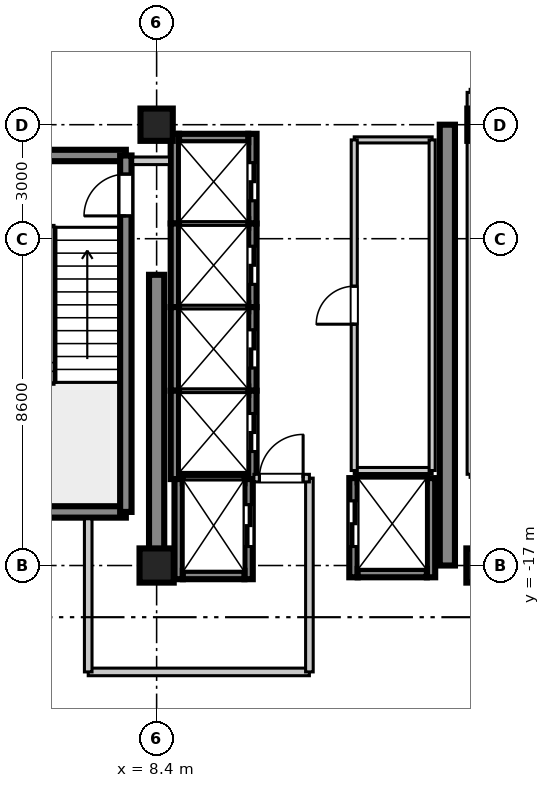
"""IFC4 building model, lengths in metres.
Left out: names, types, materials, properties, quantities, classifications, styles, units other than length and angle.
Written with IfcOpenShell. Run it as: python <this file> out.ifc"""

import sys

from ifc_helpers import new_model, si_unit, direction, frame, frame_2d, origin, origin_2d, place, context, subcontext, project, spatial, rectangle, extrude, source, transform, mapped, element, fill, save


model = new_model("IFC4")
c1 = context("Model", 3, precision=1e-05, world=origin(), true_north=direction((0.0, 1.0)))
c2 = subcontext(c1, "Body", "Model", "MODEL_VIEW")
j1 = project(units=[si_unit("LENGTHUNIT", "METRE"), si_unit("PLANEANGLEUNIT", "RADIAN")], contexts=[c1])
p1 = place(None, origin())
s1 = spatial("IfcSite", under=j1, at=p1, CompositionType="ELEMENT")
p2 = place(p1, origin())
s2 = spatial("IfcBuilding", under=s1, at=p2, CompositionType="ELEMENT")
p3 = place(p2, frame((0.0, 0.0, 343.05)))
s3 = spatial("IfcBuildingStorey", under=s2, at=p3, CompositionType="ELEMENT", Elevation=343.05)
m1 = source(origin(), c2, "Body", "SweptSolid", [
    extrude(rectangle(XDim=0.9, YDim=0.9, at=origin_2d()), origin(), (0.0, 0.0, 1.0), 4.455),
])
p4 = place(p3, frame((8.4, -17.0, 0.0), z_axis=(0.0, 0.0, 1.0), x_axis=(1.0, 0.0, 0.0)))
e1 = element("IfcColumn", 1, at=p4, inside=s3, PredefinedType="COLUMN", context=c2, shape_type="MappedRepresentation", body=[
    mapped(m1, transform((0.0, 0.0, 0.0), scale=1.0)),
])
m2 = source(origin(), c2, "Body", "SweptSolid", [
    extrude(rectangle(XDim=0.85, YDim=0.85, at=origin_2d()), origin(), (0.0, 0.0, 1.0), 4.455),
])
p5 = place(p3, frame((8.4, -5.4, 0.0), z_axis=(0.0, 0.0, 1.0), x_axis=(1.0, 0.0, 0.0)))
e2 = element("IfcColumn", 2, at=p5, inside=s3, PredefinedType="PILASTER", context=c2, shape_type="MappedRepresentation", body=[
    mapped(m2, transform((0.0, 0.0, 0.0), scale=1.0)),
])
p6 = place(p3, frame((17.0, -17.0, 0.0), z_axis=(0.0, 0.0, 1.0), x_axis=(1.0, 0.0, 0.0)))
e3 = element("IfcColumn", 3, at=p6, inside=s3, PredefinedType="COLUMN", context=c2, shape_type="MappedRepresentation", body=[
    mapped(m1, transform((0.0, 0.0, 0.0), scale=1.0)),
])
p7 = place(p3, frame((17.0, -5.4, 0.0), z_axis=(0.0, 0.0, 1.0), x_axis=(1.0, 0.0, 0.0)))
e4 = element("IfcColumn", 4, at=p7, inside=s3, PredefinedType="PILASTER", context=c2, shape_type="MappedRepresentation", body=[
    mapped(m2, transform((0.0, 0.0, 0.0), scale=1.0)),
])
m3 = source(origin(), c2, "Body", "SweptSolid", [
    extrude(rectangle(XDim=7.65, YDim=0.4, at=frame_2d((3.825, 0.0))), origin(), (0.0, 0.0, 1.0), 4.17),
])
p8 = place(p3, frame((8.4, -17.0, 0.0), z_axis=(0.0, 0.0, 1.0), x_axis=(0.0, 1.0, 0.0)))
e5 = element("IfcWall", 5, at=p8, inside=s3, PredefinedType="SHEAR", context=c2, shape_type="MappedRepresentation", body=[
    mapped(m3, transform((0.0, 0.0, 0.0), scale=1.0)),
])
m4 = source(origin(), c2, "Body", "SweptSolid", [
    extrude(rectangle(XDim=11.6, YDim=0.4, at=frame_2d((5.8, 0.0))), origin(), (0.0, 0.0, 1.0), 4.17),
])
p9 = place(p3, frame((16.05, -17.0, 0.0), z_axis=(0.0, 0.0, 1.0), x_axis=(0.0, 1.0, 0.0)))
e6 = element("IfcWall", 6, at=p9, inside=s3, PredefinedType="SHEAR", context=c2, shape_type="MappedRepresentation", body=[
    mapped(m4, transform((0.0, 0.0, 0.0), scale=1.0)),
])
m5 = source(origin(), c2, "Body", "SweptSolid", [
    extrude(rectangle(XDim=3.98, YDim=0.3, at=frame_2d((1.99, 0.0))), origin(), (0.0, 0.0, 1.0), 4.17),
])
for number, where, z_axis, x_axis in (
    (7, (3.61, -15.59, 0.0), (0.0, 0.0, 1.0), (1.0, 0.0, 0.0)),
    (8, (3.61, -6.21, 0.0), (0.0, 0.0, 1.0), (1.0, 0.0, 0.0)),
):
    element("IfcWall", number, at=place(p3, frame(where, z_axis=z_axis, x_axis=x_axis)), inside=s3, PredefinedType="SHEAR", context=c2, shape_type="MappedRepresentation", body=[
        mapped(m5, transform((0.0, 0.0, 0.0), scale=1.0)),
    ])
m6 = source(origin(), c2, "Body", "SweptSolid", [
    extrude(rectangle(XDim=9.38, YDim=0.3, at=frame_2d((4.69, 0.0))), origin(), (0.0, 0.0, 1.0), 4.17),
])
p10 = place(p3, frame((7.59, -15.59, 0.0), z_axis=(0.0, 0.0, 1.0), x_axis=(0.0, 1.0, 0.0)))
e9 = element("IfcWall", 9, at=p10, inside=s3, PredefinedType="SHEAR", context=c2, shape_type="MappedRepresentation", body=[
    mapped(m6, transform((0.0, 0.0, 0.0), scale=1.0)),
])
p11 = place(p10, frame((7.79, 0.0, 0.0)))
e10 = element("IfcOpeningElement", 10, at=p11, cuts=e9, PredefinedType="OPENING", context=c2, shape_type="SweptSolid", body=[
    extrude(rectangle(XDim=1.1, YDim=2.15, at=frame_2d((0.55, 1.075))), frame((0.0, 0.16, 0.0), z_axis=(0.0, -1.0, 0.0), x_axis=(1.0, 0.0, 0.0)), (0.0, 0.0, 1.0), 0.32),
])
m7 = source(origin(), c2, "Body", "SweptSolid", [
    extrude(rectangle(XDim=2.36, YDim=0.22, at=frame_2d((1.18, 0.0))), origin(), (0.0, 0.0, 1.0), 4.17),
])
p12 = place(p3, frame((8.88, -8.0, 0.0), z_axis=(0.0, 0.0, 1.0), x_axis=(0.0, 1.0, 0.0)))
e11 = element("IfcWall", 11, at=p12, inside=s3, PredefinedType="SHEAR", context=c2, shape_type="MappedRepresentation", body=[
    mapped(m7, transform((0.0, 0.0, 0.0), scale=1.0)),
])
p13 = place(p3, frame((10.92, -8.0, 0.0), z_axis=(0.0, 0.0, 1.0), x_axis=(0.0, 1.0, 0.0)))
e12 = element("IfcWall", 12, at=p13, inside=s3, PredefinedType="SHEAR", context=c2, shape_type="MappedRepresentation", body=[
    mapped(m7, transform((0.0, 0.0, 0.0), scale=1.0)),
])
p14 = place(p13, frame((0.6, 0.0, 0.0)))
e13 = element("IfcOpeningElement", 13, at=p14, cuts=e12, PredefinedType="OPENING", context=c2, shape_type="SweptSolid", body=[
    extrude(rectangle(XDim=1.0, YDim=2.2, at=frame_2d((0.5, 1.1))), frame((0.0, 0.12, 0.0), z_axis=(0.0, -1.0, 0.0), x_axis=(1.0, 0.0, 0.0)), (0.0, 0.0, 1.0), 0.24),
])
m8 = source(origin(), c2, "Body", "SweptSolid", [
    extrude(rectangle(XDim=1.82, YDim=0.22, at=frame_2d((0.91, 0.0))), origin(), (0.0, 0.0, 1.0), 4.17),
])
p15 = place(p3, frame((8.99, -5.75, 0.0), z_axis=(0.0, 0.0, 1.0), x_axis=(1.0, 0.0, 0.0)))
e14 = element("IfcWall", 14, at=p15, inside=s3, PredefinedType="SHEAR", context=c2, shape_type="MappedRepresentation", body=[
    mapped(m8, transform((0.0, 0.0, 0.0), scale=1.0)),
])
m9 = source(origin(), c2, "Body", "SweptSolid", [
    extrude(rectangle(XDim=2.2, YDim=0.22, at=frame_2d((1.1, 0.0))), origin(), (0.0, 0.0, 1.0), 4.17),
])
p16 = place(p3, frame((8.88, -10.2, 0.0), z_axis=(0.0, 0.0, 1.0), x_axis=(0.0, 1.0, 0.0)))
e15 = element("IfcWall", 15, at=p16, inside=s3, PredefinedType="SHEAR", context=c2, shape_type="MappedRepresentation", body=[
    mapped(m9, transform((0.0, 0.0, 0.0), scale=1.0)),
])
p17 = place(p3, frame((10.92, -10.2, 0.0), z_axis=(0.0, 0.0, 1.0), x_axis=(0.0, 1.0, 0.0)))
e16 = element("IfcWall", 16, at=p17, inside=s3, PredefinedType="SHEAR", context=c2, shape_type="MappedRepresentation", body=[
    mapped(m9, transform((0.0, 0.0, 0.0), scale=1.0)),
])
p18 = place(p17, frame((0.6, 0.0, 0.0)))
e17 = element("IfcOpeningElement", 17, at=p18, cuts=e16, PredefinedType="OPENING", context=c2, shape_type="SweptSolid", body=[
    extrude(rectangle(XDim=1.0, YDim=2.2, at=frame_2d((0.5, 1.1))), frame((0.0, 0.12, 0.0), z_axis=(0.0, -1.0, 0.0), x_axis=(1.0, 0.0, 0.0)), (0.0, 0.0, 1.0), 0.24),
])
m10 = source(origin(), c2, "Body", "SweptSolid", [
    extrude(rectangle(XDim=1.82, YDim=0.22, at=frame_2d((0.91, 0.0))), origin(), (0.0, 0.0, 1.0), 4.5),
])
p19 = place(p3, frame((8.99, -8.0, 0.0), z_axis=(0.0, 0.0, 1.0), x_axis=(1.0, 0.0, 0.0)))
e18 = element("IfcWall", 18, at=p19, inside=s3, PredefinedType="SHEAR", context=c2, shape_type="MappedRepresentation", body=[
    mapped(m10, transform((0.0, 0.0, 0.0), scale=1.0)),
])
p20 = place(p3, frame((8.88, -12.4, 0.0), z_axis=(0.0, 0.0, 1.0), x_axis=(0.0, 1.0, 0.0)))
e19 = element("IfcWall", 19, at=p20, inside=s3, PredefinedType="SHEAR", context=c2, shape_type="MappedRepresentation", body=[
    mapped(m9, transform((0.0, 0.0, 0.0), scale=1.0)),
])
p21 = place(p3, frame((10.92, -12.4, 0.0), z_axis=(0.0, 0.0, 1.0), x_axis=(0.0, 1.0, 0.0)))
e20 = element("IfcWall", 20, at=p21, inside=s3, PredefinedType="SHEAR", context=c2, shape_type="MappedRepresentation", body=[
    mapped(m9, transform((0.0, 0.0, 0.0), scale=1.0)),
])
p22 = place(p21, frame((0.6, 0.0, 0.0)))
e21 = element("IfcOpeningElement", 21, at=p22, cuts=e20, PredefinedType="OPENING", context=c2, shape_type="SweptSolid", body=[
    extrude(rectangle(XDim=1.0, YDim=2.2, at=frame_2d((0.5, 1.1))), frame((0.0, 0.12, 0.0), z_axis=(0.0, -1.0, 0.0), x_axis=(1.0, 0.0, 0.0)), (0.0, 0.0, 1.0), 0.24),
])
p23 = place(p3, frame((8.99, -10.2, 0.0), z_axis=(0.0, 0.0, 1.0), x_axis=(1.0, 0.0, 0.0)))
e22 = element("IfcWall", 22, at=p23, inside=s3, PredefinedType="SHEAR", context=c2, shape_type="MappedRepresentation", body=[
    mapped(m10, transform((0.0, 0.0, 0.0), scale=1.0)),
])
m11 = source(origin(), c2, "Body", "SweptSolid", [
    extrude(rectangle(XDim=2.325, YDim=0.22, at=frame_2d((1.163, 0.0))), origin(), (0.0, 0.0, 1.0), 4.17),
])
p24 = place(p3, frame((8.88, -14.725, 0.0), z_axis=(0.0, 0.0, 1.0), x_axis=(0.0, 1.0, 0.0)))
e23 = element("IfcWall", 23, at=p24, inside=s3, PredefinedType="SHEAR", context=c2, shape_type="MappedRepresentation", body=[
    mapped(m11, transform((0.0, 0.0, 0.0), scale=1.0)),
])
p25 = place(p3, frame((10.92, -14.725, 0.0), z_axis=(0.0, 0.0, 1.0), x_axis=(0.0, 1.0, 0.0)))
e24 = element("IfcWall", 24, at=p25, inside=s3, PredefinedType="SHEAR", context=c2, shape_type="MappedRepresentation", body=[
    mapped(m11, transform((0.0, 0.0, 0.0), scale=1.0)),
])
p26 = place(p25, frame((0.725, 0.0, 0.0)))
e25 = element("IfcOpeningElement", 25, at=p26, cuts=e24, PredefinedType="OPENING", context=c2, shape_type="SweptSolid", body=[
    extrude(rectangle(XDim=1.0, YDim=2.2, at=frame_2d((0.5, 1.1))), frame((0.0, 0.12, 0.0), z_axis=(0.0, -1.0, 0.0), x_axis=(1.0, 0.0, 0.0)), (0.0, 0.0, 1.0), 0.24),
])
p27 = place(p3, frame((8.99, -12.4, 0.0), z_axis=(0.0, 0.0, 1.0), x_axis=(1.0, 0.0, 0.0)))
e26 = element("IfcWall", 26, at=p27, inside=s3, PredefinedType="SHEAR", context=c2, shape_type="MappedRepresentation", body=[
    mapped(m10, transform((0.0, 0.0, 0.0), scale=1.0)),
])
m12 = source(origin(), c2, "Body", "SweptSolid", [
    extrude(rectangle(XDim=2.635, YDim=0.22, at=frame_2d((1.317, 0.0))), origin(), (0.0, 0.0, 1.0), 4.17),
])
p28 = place(p3, frame((8.98, -17.36, 0.0), z_axis=(0.0, 0.0, 1.0), x_axis=(0.0, 1.0, 0.0)))
e27 = element("IfcWall", 27, at=p28, inside=s3, PredefinedType="SHEAR", context=c2, shape_type="MappedRepresentation", body=[
    mapped(m12, transform((0.0, 0.0, 0.0), scale=1.0)),
])
p29 = place(p3, frame((10.82, -17.36, 0.0), z_axis=(0.0, 0.0, 1.0), x_axis=(0.0, 1.0, 0.0)))
e28 = element("IfcWall", 28, at=p29, inside=s3, PredefinedType="SHEAR", context=c2, shape_type="MappedRepresentation", body=[
    mapped(m12, transform((0.0, 0.0, 0.0), scale=1.0)),
])
p30 = place(p29, frame((0.86, 0.0, 0.0)))
e29 = element("IfcOpeningElement", 29, at=p30, cuts=e28, PredefinedType="OPENING", context=c2, shape_type="SweptSolid", body=[
    extrude(rectangle(XDim=1.1, YDim=2.2, at=frame_2d((0.55, 1.1))), frame((0.0, 0.12, 0.0), z_axis=(0.0, -1.0, 0.0), x_axis=(1.0, 0.0, 0.0)), (0.0, 0.0, 1.0), 0.24),
])
m13 = source(origin(), c2, "Body", "SweptSolid", [
    extrude(rectangle(XDim=1.62, YDim=0.22, at=frame_2d((0.81, 0.0))), origin(), (0.0, 0.0, 1.0), 4.17),
])
p31 = place(p3, frame((9.09, -17.25, 0.0), z_axis=(0.0, 0.0, 1.0), x_axis=(1.0, 0.0, 0.0)))
e30 = element("IfcWall", 30, at=p31, inside=s3, PredefinedType="SHEAR", context=c2, shape_type="MappedRepresentation", body=[
    mapped(m13, transform((0.0, 0.0, 0.0), scale=1.0)),
])
m14 = source(origin(), c2, "Body", "SweptSolid", [
    extrude(rectangle(XDim=1.62, YDim=0.22, at=frame_2d((0.81, 0.0))), origin(), (0.0, 0.0, 1.0), 4.5),
])
p32 = place(p3, frame((9.09, -14.725, 0.0), z_axis=(0.0, 0.0, 1.0), x_axis=(1.0, 0.0, 0.0)))
e31 = element("IfcWall", 31, at=p32, inside=s3, PredefinedType="SHEAR", context=c2, shape_type="MappedRepresentation", body=[
    mapped(m14, transform((0.0, 0.0, 0.0), scale=1.0)),
])
m15 = source(origin(), c2, "Body", "SweptSolid", [
    extrude(rectangle(XDim=2.61, YDim=0.22, at=frame_2d((1.305, 0.0))), origin(), (0.0, 0.0, 1.0), 4.17),
])
p33 = place(p3, frame((13.58, -17.31, 0.0), z_axis=(0.0, 0.0, 1.0), x_axis=(0.0, 1.0, 0.0)))
e32 = element("IfcWall", 32, at=p33, inside=s3, PredefinedType="SHEAR", context=c2, shape_type="MappedRepresentation", body=[
    mapped(m15, transform((0.0, 0.0, 0.0), scale=1.0)),
])
p34 = place(p33, frame((0.81, 0.0, 0.0)))
e33 = element("IfcOpeningElement", 33, at=p34, cuts=e32, PredefinedType="OPENING", context=c2, shape_type="SweptSolid", body=[
    extrude(rectangle(XDim=1.2, YDim=2.2, at=frame_2d((0.6, 1.1))), frame((0.0, 0.12, 0.0), z_axis=(0.0, -1.0, 0.0), x_axis=(1.0, 0.0, 0.0)), (0.0, 0.0, 1.0), 0.24),
])
p35 = place(p3, frame((15.62, -17.31, 0.0), z_axis=(0.0, 0.0, 1.0), x_axis=(0.0, 1.0, 0.0)))
e34 = element("IfcWall", 34, at=p35, inside=s3, PredefinedType="SHEAR", context=c2, shape_type="MappedRepresentation", body=[
    mapped(m15, transform((0.0, 0.0, 0.0), scale=1.0)),
])
p36 = place(p3, frame((13.69, -17.2, 0.0), z_axis=(0.0, 0.0, 1.0), x_axis=(1.0, 0.0, 0.0)))
e35 = element("IfcWall", 35, at=p36, inside=s3, PredefinedType="SHEAR", context=c2, shape_type="MappedRepresentation", body=[
    mapped(m8, transform((0.0, 0.0, 0.0), scale=1.0)),
])
p37 = place(p3, frame((13.69, -14.7, 0.0), z_axis=(0.0, 0.0, 1.0), x_axis=(1.0, 0.0, 0.0)))
e36 = element("IfcWall", 36, at=p37, inside=s3, PredefinedType="SHEAR", context=c2, shape_type="MappedRepresentation", body=[
    mapped(m10, transform((0.0, 0.0, 0.0), scale=1.0)),
])
m16 = source(origin(), c2, "Body", "SweptSolid", [
    extrude(rectangle(XDim=5.82, YDim=0.2, at=frame_2d((2.91, 0.0))), origin(), (0.0, 0.0, 1.0), 3.4),
])
p38 = place(p3, frame((6.6, -19.8, 0.0), z_axis=(0.0, 0.0, 1.0), x_axis=(1.0, 0.0, 0.0)))
e37 = element("IfcWall", 37, at=p38, inside=s3, PredefinedType="PARTITIONING", context=c2, shape_type="MappedRepresentation", body=[
    mapped(m16, transform((0.0, 0.0, 0.0), scale=1.0)),
])
m17 = source(origin(), c2, "Body", "SweptSolid", [
    extrude(rectangle(XDim=4.03, YDim=0.2, at=frame_2d((2.015, 0.0))), origin(), (0.0, 0.0, 1.0), 3.4),
])
p39 = place(p3, frame((6.6, -19.8, 0.0), z_axis=(0.0, 0.0, 1.0), x_axis=(0.0, 1.0, 0.0)))
e38 = element("IfcWall", 38, at=p39, inside=s3, PredefinedType="PARTITIONING", context=c2, shape_type="MappedRepresentation", body=[
    mapped(m17, transform((0.0, 0.0, 0.0), scale=1.0)),
])
m18 = source(origin(), c2, "Body", "SweptSolid", [
    extrude(rectangle(XDim=5.1, YDim=0.2, at=frame_2d((2.55, 0.0))), origin(), (0.0, 0.0, 1.0), 3.4),
])
p40 = place(p3, frame((12.42, -19.8, 0.0), z_axis=(0.0, 0.0, 1.0), x_axis=(0.0, 1.0, 0.0)))
e39 = element("IfcWall", 39, at=p40, inside=s3, PredefinedType="PARTITIONING", context=c2, shape_type="MappedRepresentation", body=[
    mapped(m18, transform((0.0, 0.0, 0.0), scale=1.0)),
])
m19 = source(origin(), c2, "Body", "SweptSolid", [
    extrude(rectangle(XDim=1.46, YDim=0.2, at=frame_2d((0.73, 0.0))), origin(), (0.0, 0.0, 1.0), 3.4),
])
p41 = place(p3, frame((10.96, -14.7, 0.0), z_axis=(0.0, 0.0, 1.0), x_axis=(1.0, 0.0, 0.0)))
e40 = element("IfcWall", 40, at=p41, inside=s3, PredefinedType="PARTITIONING", context=c2, shape_type="MappedRepresentation", body=[
    mapped(m19, transform((0.0, 0.0, 0.0), scale=1.0)),
])
p42 = place(p41, frame((0.145, 0.0, 0.0)))
e41 = element("IfcOpeningElement", 41, at=p42, cuts=e40, PredefinedType="OPENING", context=c2, shape_type="SweptSolid", body=[
    extrude(rectangle(XDim=1.15, YDim=2.15, at=frame_2d((0.575, 1.075))), frame((0.0, 0.11, 0.0), z_axis=(0.0, -1.0, 0.0), x_axis=(1.0, 0.0, 0.0)), (0.0, 0.0, 1.0), 0.22),
])
m20 = source(origin(), c2, "Body", "SweptSolid", [
    extrude(rectangle(XDim=0.97, YDim=0.2, at=frame_2d((0.485, 0.0))), origin(), (0.0, 0.0, 1.0), 3.4),
])
p43 = place(p3, frame((7.77, -6.35, 0.0), z_axis=(0.0, 0.0, 1.0), x_axis=(1.0, 0.0, 0.0)))
e42 = element("IfcWall", 42, at=p43, inside=s3, PredefinedType="PARTITIONING", context=c2, shape_type="MappedRepresentation", body=[
    mapped(m20, transform((0.0, 0.0, 0.0), scale=1.0)),
])
m21 = source(origin(), c2, "Body", "SweptSolid", [
    extrude(rectangle(XDim=2.05, YDim=0.16, at=frame_2d((1.025, 0.0))), origin(), (0.0, 0.0, 1.0), 3.4),
])
for number, where, z_axis, x_axis in (
    (43, (13.6, -14.5, 0.0), (0.0, 0.0, 1.0), (1.0, 0.0, 0.0)),
    (44, (13.6, -5.8, 0.0), (0.0, 0.0, 1.0), (1.0, 0.0, 0.0)),
):
    element("IfcWall", number, at=place(p3, frame(where, z_axis=z_axis, x_axis=x_axis)), inside=s3, PredefinedType="PARTITIONING", context=c2, shape_type="MappedRepresentation", body=[
        mapped(m21, transform((0.0, 0.0, 0.0), scale=1.0)),
    ])
m22 = source(origin(), c2, "Body", "SweptSolid", [
    extrude(rectangle(XDim=8.7, YDim=0.16, at=frame_2d((4.35, 0.0))), origin(), (0.0, 0.0, 1.0), 3.4),
])
p44 = place(p3, frame((13.6, -14.5, 0.0), z_axis=(0.0, 0.0, 1.0), x_axis=(0.0, 1.0, 0.0)))
e45 = element("IfcWall", 45, at=p44, inside=s3, PredefinedType="PARTITIONING", context=c2, shape_type="MappedRepresentation", body=[
    mapped(m22, transform((0.0, 0.0, 0.0), scale=1.0)),
])
p45 = place(p44, frame((3.85, 0.0, 0.0)))
e46 = element("IfcOpeningElement", 46, at=p45, cuts=e45, PredefinedType="OPENING", context=c2, shape_type="SweptSolid", body=[
    extrude(rectangle(XDim=1.0, YDim=2.1, at=frame_2d((0.5, 1.05))), frame((0.0, 0.09, 0.0), z_axis=(0.0, -1.0, 0.0), x_axis=(1.0, 0.0, 0.0)), (0.0, 0.0, 1.0), 0.18),
])
p46 = place(p3, frame((15.65, -14.5, 0.0), z_axis=(0.0, 0.0, 1.0), x_axis=(0.0, 1.0, 0.0)))
e47 = element("IfcWall", 47, at=p46, inside=s3, PredefinedType="PARTITIONING", context=c2, shape_type="MappedRepresentation", body=[
    mapped(m22, transform((0.0, 0.0, 0.0), scale=1.0)),
])
m23 = source(origin(), c2, "Body", "SweptSolid", [
    extrude(rectangle(XDim=10.05, YDim=0.16, at=frame_2d((5.025, 0.0))), origin(), (0.0, 0.0, 1.0), 3.4),
])
p47 = place(p3, frame((16.65, -14.6, 0.0), z_axis=(0.0, 0.0, 1.0), x_axis=(0.0, 1.0, 0.0)))
e48 = element("IfcWall", 48, at=p47, inside=s3, PredefinedType="PARTITIONING", context=c2, shape_type="MappedRepresentation", body=[
    mapped(m23, transform((0.0, 0.0, 0.0), scale=1.0)),
])
m24 = source(origin(), c2, "Body", "SweptSolid", [
    extrude(rectangle(XDim=1.1, YDim=2.15, at=frame_2d((0.55, 1.075))), frame((0.0, 0.025, 0.0), z_axis=(0.0, -1.0, 0.0), x_axis=(1.0, 0.0, 0.0)), (0.0, 0.0, 1.0), 0.05),
])
p48 = place(p11, origin())
e49 = element("IfcDoor", 49, at=p48, inside=s3, OperationType="SINGLE_SWING_LEFT", PredefinedType="DOOR", context=c2, shape_type="MappedRepresentation", body=[
    mapped(m24, transform((0.0, 0.0, 0.0), scale=1.0)),
])
fill(e10, e49)
m25 = source(origin(), c2, "Body", "SweptSolid", [
    extrude(rectangle(XDim=1.0, YDim=2.2, at=frame_2d((0.5, 1.1))), frame((0.0, 0.025, 0.0), z_axis=(0.0, -1.0, 0.0), x_axis=(1.0, 0.0, 0.0)), (0.0, 0.0, 1.0), 0.05),
])
p49 = place(p14, frame((1.0, 0.0, 0.0), z_axis=(0.0, 0.0, 1.0), x_axis=(-1.0, 0.0, 0.0)))
e50 = element("IfcDoor", 50, at=p49, inside=s3, OperationType="DOUBLE_DOOR_SLIDING", PredefinedType="DOOR", context=c2, shape_type="MappedRepresentation", body=[
    mapped(m25, transform((0.0, 0.0, 0.0), scale=1.0)),
])
fill(e13, e50)
p50 = place(p18, frame((1.0, 0.0, 0.0), z_axis=(0.0, 0.0, 1.0), x_axis=(-1.0, 0.0, 0.0)))
e51 = element("IfcDoor", 51, at=p50, inside=s3, OperationType="DOUBLE_DOOR_SLIDING", PredefinedType="DOOR", context=c2, shape_type="MappedRepresentation", body=[
    mapped(m25, transform((0.0, 0.0, 0.0), scale=1.0)),
])
fill(e17, e51)
p51 = place(p22, frame((1.0, 0.0, 0.0), z_axis=(0.0, 0.0, 1.0), x_axis=(-1.0, 0.0, 0.0)))
e52 = element("IfcDoor", 52, at=p51, inside=s3, OperationType="DOUBLE_DOOR_SLIDING", PredefinedType="DOOR", context=c2, shape_type="MappedRepresentation", body=[
    mapped(m25, transform((0.0, 0.0, 0.0), scale=1.0)),
])
fill(e21, e52)
p52 = place(p26, frame((1.0, 0.0, 0.0), z_axis=(0.0, 0.0, 1.0), x_axis=(-1.0, 0.0, 0.0)))
e53 = element("IfcDoor", 53, at=p52, inside=s3, OperationType="DOUBLE_DOOR_SLIDING", PredefinedType="DOOR", context=c2, shape_type="MappedRepresentation", body=[
    mapped(m25, transform((0.0, 0.0, 0.0), scale=1.0)),
])
fill(e25, e53)
m26 = source(origin(), c2, "Body", "SweptSolid", [
    extrude(rectangle(XDim=1.1, YDim=2.2, at=frame_2d((0.55, 1.1))), frame((0.0, 0.025, 0.0), z_axis=(0.0, -1.0, 0.0), x_axis=(1.0, 0.0, 0.0)), (0.0, 0.0, 1.0), 0.05),
])
p53 = place(p30, frame((1.1, 0.0, 0.0), z_axis=(0.0, 0.0, 1.0), x_axis=(-1.0, 0.0, 0.0)))
e54 = element("IfcDoor", 54, at=p53, inside=s3, OperationType="DOUBLE_DOOR_SLIDING", PredefinedType="DOOR", context=c2, shape_type="MappedRepresentation", body=[
    mapped(m26, transform((0.0, 0.0, 0.0), scale=1.0)),
])
fill(e29, e54)
m27 = source(origin(), c2, "Body", "SweptSolid", [
    extrude(rectangle(XDim=1.2, YDim=2.2, at=frame_2d((0.6, 1.1))), frame((0.0, 0.025, 0.0), z_axis=(0.0, -1.0, 0.0), x_axis=(1.0, 0.0, 0.0)), (0.0, 0.0, 1.0), 0.05),
])
p54 = place(p34, origin())
e55 = element("IfcDoor", 55, at=p54, inside=s3, OperationType="DOUBLE_DOOR_SLIDING", PredefinedType="DOOR", context=c2, shape_type="MappedRepresentation", body=[
    mapped(m27, transform((0.0, 0.0, 0.0), scale=1.0)),
])
fill(e33, e55)
m28 = source(origin(), c2, "Body", "SweptSolid", [
    extrude(rectangle(XDim=1.15, YDim=2.15, at=frame_2d((0.575, 1.075))), frame((0.0, 0.025, 0.0), z_axis=(0.0, -1.0, 0.0), x_axis=(1.0, 0.0, 0.0)), (0.0, 0.0, 1.0), 0.05),
])
p55 = place(p42, origin())
e56 = element("IfcDoor", 56, at=p55, inside=s3, OperationType="SINGLE_SWING_RIGHT", PredefinedType="DOOR", context=c2, shape_type="MappedRepresentation", body=[
    mapped(m28, transform((0.0, 0.0, 0.0), scale=1.0)),
])
fill(e41, e56)
m29 = source(origin(), c2, "Body", "SweptSolid", [
    extrude(rectangle(XDim=1.0, YDim=2.1, at=frame_2d((0.5, 1.05))), frame((0.0, 0.025, 0.0), z_axis=(0.0, -1.0, 0.0), x_axis=(1.0, 0.0, 0.0)), (0.0, 0.0, 1.0), 0.05),
])
p56 = place(p45, frame((1.0, 0.0, 0.0), z_axis=(0.0, 0.0, 1.0), x_axis=(-1.0, 0.0, 0.0)))
e57 = element("IfcDoor", 57, at=p56, inside=s3, OperationType="SINGLE_SWING_LEFT", PredefinedType="DOOR", context=c2, shape_type="MappedRepresentation", body=[
    mapped(m29, transform((0.0, 0.0, 0.0), scale=1.0)),
])
fill(e46, e57)
save(model, sys.argv[1])
